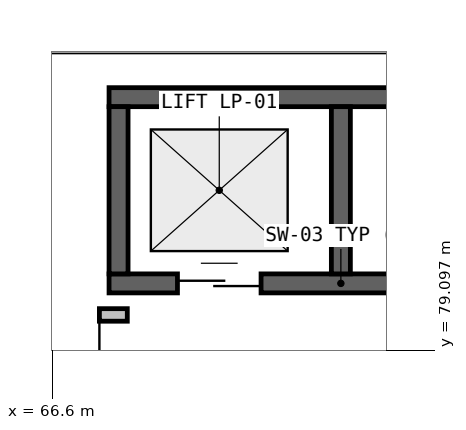
"""IFC4 building model, lengths in metres.
Left out: names, types, materials, properties, quantities, classifications, styles, units other than length and angle.
Written with IfcOpenShell. Run it as: python <this file> out.ifc"""

import sys

from ifc_helpers import new_model, si_unit, direction, frame, frame_2d, origin, place, context, subcontext, project, spatial, rectangle, extrude, element, fill, save


model = new_model("IFC4")
c1 = context("Model", 3, precision=1e-05, world=origin(), true_north=direction((0.0, 1.0)))
c2 = subcontext(c1, "Body", "Model", "MODEL_VIEW")
j1 = project(units=[si_unit("LENGTHUNIT", "METRE"), si_unit("PLANEANGLEUNIT", "RADIAN")], contexts=[c1])
p1 = place(None, origin())
s1 = spatial("IfcSite", under=j1, at=p1, CompositionType="ELEMENT")
p2 = place(p1, origin())
s2 = spatial("IfcBuilding", under=s1, at=p2, CompositionType="ELEMENT")
p3 = place(p2, frame((0.0, 0.0, -4.8)))
s3 = spatial("IfcBuildingStorey", under=s2, at=p3, CompositionType="ELEMENT", Elevation=-4.8)
p4 = place(p3, frame((67.35, 79.975, 0.0), z_axis=(0.0, 0.0, 1.0), x_axis=(1.0, 0.0, 0.0)))
e1 = element("IfcWall", 1, at=p4, inside=s3, PredefinedType="SHEAR", context=c2, shape_type="SweptSolid", body=[
    extrude(rectangle(XDim=6.1, YDim=0.25, at=frame_2d((3.05, 0.0))), origin(), (0.0, 0.0, 1.0), 4.45),
])
p5 = place(p4, frame((0.9, 0.0, 0.0)))
e2 = element("IfcOpeningElement", 2, at=p5, cuts=e1, PredefinedType="OPENING", context=c2, shape_type="SweptSolid", body=[
    extrude(rectangle(XDim=1.1, YDim=2.15, at=frame_2d((0.55, 1.075))), frame((0.0, 0.135, 0.0), z_axis=(0.0, -1.0, 0.0), x_axis=(1.0, 0.0, 0.0)), (0.0, 0.0, 1.0), 0.27),
])
p6 = place(p4, frame((4.1, 0.0, 0.0)))
e3 = element("IfcOpeningElement", 3, at=p6, cuts=e1, PredefinedType="OPENING", context=c2, shape_type="SweptSolid", body=[
    extrude(rectangle(XDim=1.1, YDim=2.15, at=frame_2d((0.55, 1.075))), frame((0.0, 0.135, 0.0), z_axis=(0.0, -1.0, 0.0), x_axis=(1.0, 0.0, 0.0)), (0.0, 0.0, 1.0), 0.27),
])
p7 = place(p3, frame((73.45, 82.425, 0.0), z_axis=(0.0, 0.0, 1.0), x_axis=(-1.0, 0.0, 0.0)))
e4 = element("IfcWall", 4, at=p7, inside=s3, PredefinedType="SHEAR", context=c2, shape_type="SweptSolid", body=[
    extrude(rectangle(XDim=6.1, YDim=0.25, at=frame_2d((3.05, 0.0))), origin(), (0.0, 0.0, 1.0), 4.45),
])
for number, where, z_axis, x_axis in (
    (5, (67.475, 82.3, 0.0), (0.0, 0.0, 1.0), (0.0, -1.0, 0.0)),
    (6, (70.4, 80.1, 0.0), (0.0, 0.0, 1.0), (0.0, 1.0, 0.0)),
):
    element("IfcWall", number, at=place(p3, frame(where, z_axis=z_axis, x_axis=x_axis)), inside=s3, PredefinedType="SHEAR", context=c2, shape_type="SweptSolid", body=[
        extrude(rectangle(XDim=2.2, YDim=0.25, at=frame_2d((1.1, 0.0))), origin(), (0.0, 0.0, 1.0), 4.45),
    ])
p8 = place(p3, frame((67.59, 79.56, 0.0), z_axis=(0.0, 0.0, 1.0), x_axis=(-1.0, 0.0, 0.0)))
e7 = element("IfcWall", 7, at=p8, inside=s3, PredefinedType="PARTITIONING", context=c2, shape_type="SweptSolid", body=[
    extrude(rectangle(XDim=1.683, YDim=0.165, at=frame_2d((0.842, 0.0))), origin(), (0.0, 0.0, 1.0), 4.45),
])
p9 = place(p8, frame((0.367, 0.0, 0.0)))
e8 = element("IfcOpeningElement", 8, at=p9, cuts=e7, PredefinedType="OPENING", context=c2, shape_type="SweptSolid", body=[
    extrude(rectangle(XDim=0.95, YDim=2.1, at=frame_2d((0.475, 1.05))), frame((0.0, 0.093, 0.0), z_axis=(0.0, -1.0, 0.0), x_axis=(1.0, 0.0, 0.0)), (0.0, 0.0, 1.0), 0.185),
])
p10 = place(p5, origin())
e9 = element("IfcDoor", 9, at=p10, inside=s3, OperationType="DOUBLE_DOOR_SLIDING", PredefinedType="DOOR", context=c2, shape_type="SweptSolid", body=[
    extrude(rectangle(XDim=1.1, YDim=2.15, at=frame_2d((0.55, 1.075))), frame((0.0, 0.025, 0.0), z_axis=(0.0, -1.0, 0.0), x_axis=(1.0, 0.0, 0.0)), (0.0, 0.0, 1.0), 0.05),
])
fill(e2, e9)
p11 = place(p9, origin())
e10 = element("IfcDoor", 10, at=p11, inside=s3, OperationType="SINGLE_SWING_RIGHT", PredefinedType="DOOR", context=c2, shape_type="SweptSolid", body=[
    extrude(rectangle(XDim=0.95, YDim=2.1, at=frame_2d((0.475, 1.05))), frame((0.0, 0.025, 0.0), z_axis=(0.0, -1.0, 0.0), x_axis=(1.0, 0.0, 0.0)), (0.0, 0.0, 1.0), 0.05),
])
fill(e8, e10)
save(model, sys.argv[1])
